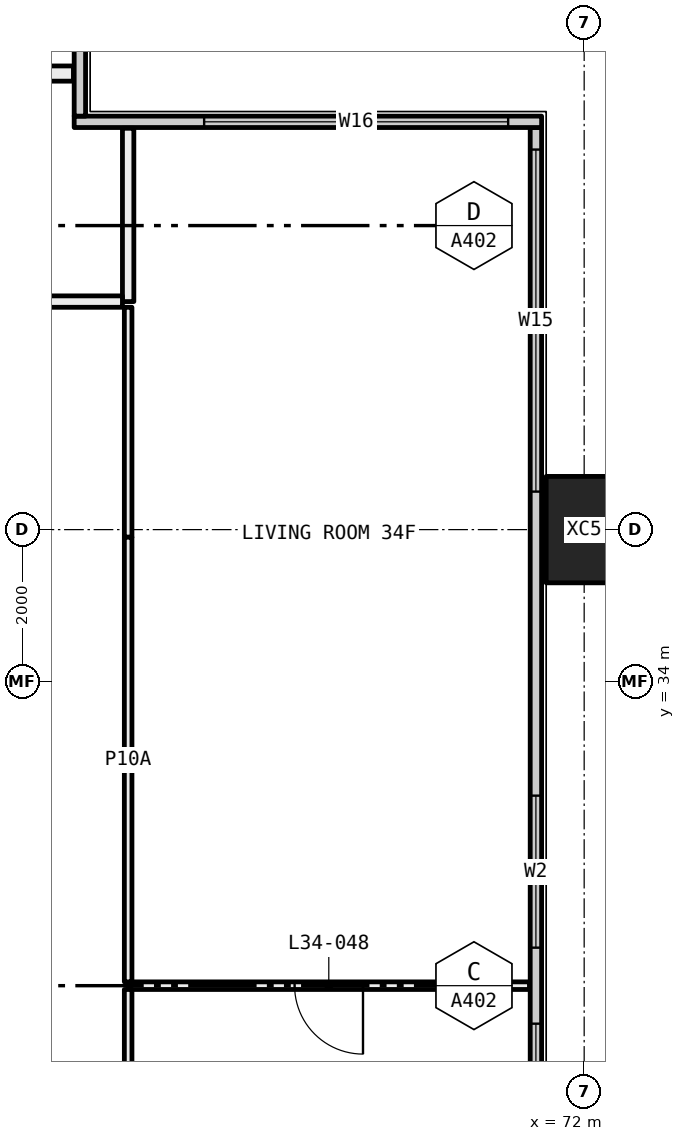
"""IFC4 building model, lengths in metres.
Left out: names, types, materials, properties, quantities, classifications, styles, units other than length and angle.
Written with IfcOpenShell. Run it as: python <this file> out.ifc"""

import sys

from ifc_helpers import new_model, si_unit, direction, frame, frame_2d, origin, origin_2d, place, context, subcontext, project, spatial, rectangle, hollow_rectangle, extrude, element, fill, save


model = new_model("IFC4")
c1 = context("Model", 3, precision=1e-05, world=origin(), true_north=direction((0.0, 1.0)))
c2 = subcontext(c1, "Body", "Model", "MODEL_VIEW")
j1 = project(units=[si_unit("LENGTHUNIT", "METRE"), si_unit("PLANEANGLEUNIT", "RADIAN")], contexts=[c1])
p1 = place(None, origin())
s1 = spatial("IfcSite", under=j1, at=p1, CompositionType="ELEMENT")
p2 = place(p1, origin())
s2 = spatial("IfcBuilding", under=s1, at=p2, CompositionType="ELEMENT")
p3 = place(p2, frame((0.0, 0.0, 131.1)))
s3 = spatial("IfcBuildingStorey", under=s2, at=p3, CompositionType="ELEMENT", Elevation=131.1)
p4 = place(p3, frame((72.0, 36.0, -0.4), z_axis=(0.0, 0.0, 1.0), x_axis=(0.0, 1.0, 0.0)))
e1 = element("IfcColumn", 1, at=p4, inside=s3, PredefinedType="COLUMN", context=c2, shape_type="SweptSolid", body=[
    extrude(hollow_rectangle(XDim=1.4, YDim=1.0, WallThickness=0.055, at=origin_2d()), origin(), (0.0, 0.0, 1.0), 3.45),
])
p5 = place(p3, frame((71.365, 18.71, 0.0), z_axis=(0.0, 0.0, 1.0), x_axis=(0.0, 1.0, 0.0)))
e2 = element("IfcWall", 2, at=p5, inside=s3, PredefinedType="ELEMENTEDWALL", context=c2, shape_type="SweptSolid", body=[
    extrude(rectangle(XDim=22.58, YDim=0.15, at=frame_2d((11.29, 0.0))), origin(), (0.0, 0.0, 1.0), 3.05),
])
p6 = place(p5, frame((0.29, 0.0, 0.45)))
e3 = element("IfcOpeningElement", 3, at=p6, cuts=e2, PredefinedType="OPENING", context=c2, shape_type="SweptSolid", body=[
    extrude(rectangle(XDim=4.5, YDim=2.55, at=frame_2d((2.25, 1.275))), frame((0.0, 0.085, 0.0), z_axis=(0.0, -1.0, 0.0), x_axis=(1.0, 0.0, 0.0)), (0.0, 0.0, 1.0), 0.17),
])
p7 = place(p5, frame((7.54, 0.0, 0.45)))
e4 = element("IfcOpeningElement", 4, at=p7, cuts=e2, PredefinedType="OPENING", context=c2, shape_type="SweptSolid", body=[
    extrude(rectangle(XDim=3.25, YDim=2.55, at=frame_2d((1.625, 1.275))), frame((0.0, 0.085, 0.0), z_axis=(0.0, -1.0, 0.0), x_axis=(1.0, 0.0, 0.0)), (0.0, 0.0, 1.0), 0.17),
])
p8 = place(p5, frame((11.79, 0.0, 0.45)))
e5 = element("IfcOpeningElement", 5, at=p8, cuts=e2, PredefinedType="OPENING", context=c2, shape_type="SweptSolid", body=[
    extrude(rectangle(XDim=2.0, YDim=2.55, at=frame_2d((1.0, 1.275))), frame((0.0, 0.085, 0.0), z_axis=(0.0, -1.0, 0.0), x_axis=(1.0, 0.0, 0.0)), (0.0, 0.0, 1.0), 0.17),
])
p9 = place(p5, frame((17.79, 0.0, 0.45)))
e6 = element("IfcOpeningElement", 6, at=p9, cuts=e2, PredefinedType="OPENING", context=c2, shape_type="SweptSolid", body=[
    extrude(rectangle(XDim=4.5, YDim=2.55, at=frame_2d((2.25, 1.275))), frame((0.0, 0.085, 0.0), z_axis=(0.0, -1.0, 0.0), x_axis=(1.0, 0.0, 0.0)), (0.0, 0.0, 1.0), 0.17),
])
p10 = place(p3, frame((65.29, 41.365, 0.0), z_axis=(0.0, 0.0, 1.0), x_axis=(1.0, 0.0, 0.0)))
e7 = element("IfcWall", 7, at=p10, inside=s3, PredefinedType="ELEMENTEDWALL", context=c2, shape_type="SweptSolid", body=[
    extrude(rectangle(XDim=6.15, YDim=0.15, at=frame_2d((3.075, 0.0))), origin(), (0.0, 0.0, 1.0), 3.05),
])
p11 = place(p10, frame((1.71, 0.0, 0.45)))
e8 = element("IfcOpeningElement", 8, at=p11, cuts=e7, PredefinedType="OPENING", context=c2, shape_type="SweptSolid", body=[
    extrude(rectangle(XDim=4.0, YDim=2.55, at=frame_2d((2.0, 1.275))), frame((0.0, 0.085, 0.0), z_axis=(0.0, -1.0, 0.0), x_axis=(1.0, 0.0, 0.0)), (0.0, 0.0, 1.0), 0.17),
])
p12 = place(p3, frame((65.365, 41.44, 0.0), z_axis=(0.0, 0.0, 1.0), x_axis=(0.0, 1.0, 0.0)))
e9 = element("IfcWall", 9, at=p12, inside=s3, PredefinedType="ELEMENTEDWALL", context=c2, shape_type="SweptSolid", body=[
    extrude(rectangle(XDim=5.85, YDim=0.15, at=frame_2d((2.925, 0.0))), origin(), (0.0, 0.0, 1.0), 3.05),
])
p13 = place(p12, frame((1.56, 0.0, 0.45)))
e10 = element("IfcOpeningElement", 10, at=p13, cuts=e9, PredefinedType="OPENING", context=c2, shape_type="SweptSolid", body=[
    extrude(rectangle(XDim=4.0, YDim=2.55, at=frame_2d((2.0, 1.275))), frame((0.0, 0.085, 0.0), z_axis=(0.0, -1.0, 0.0), x_axis=(1.0, 0.0, 0.0)), (0.0, 0.0, 1.0), 0.17),
])
p14 = place(p3, frame((61.9, 42.0, 0.0), z_axis=(0.0, 0.0, 1.0), x_axis=(1.0, 0.0, 0.0)))
e11 = element("IfcWall", 11, at=p14, inside=s3, PredefinedType="PARTITIONING", context=c2, shape_type="SweptSolid", body=[
    extrude(rectangle(XDim=3.38, YDim=0.2, at=frame_2d((1.69, 0.0))), origin(), (0.0, 0.0, 1.0), 3.05),
])
p15 = place(p3, frame((71.28, 30.0, 0.0), z_axis=(0.0, 0.0, 1.0), x_axis=(-1.0, 0.0, 0.0)))
e12 = element("IfcWall", 12, at=p15, inside=s3, PredefinedType="PARTITIONING", context=c2, shape_type="SweptSolid", body=[
    extrude(rectangle(XDim=5.28, YDim=0.1, at=frame_2d((2.64, 0.0))), origin(), (0.0, 0.0, 1.0), 3.05),
])
p16 = place(p15, frame((2.19, 0.0, 0.0)))
e13 = element("IfcOpeningElement", 13, at=p16, cuts=e12, PredefinedType="OPENING", context=c2, shape_type="SweptSolid", body=[
    extrude(rectangle(XDim=0.9, YDim=2.1, at=frame_2d((0.45, 1.05))), frame((0.0, 0.06, 0.0), z_axis=(0.0, -1.0, 0.0), x_axis=(1.0, 0.0, 0.0)), (0.0, 0.0, 1.0), 0.12),
])
p17 = place(p3, frame((66.0, 29.95, 0.0), z_axis=(0.0, 0.0, 1.0), x_axis=(0.0, -1.0, 0.0)))
e14 = element("IfcWall", 14, at=p17, inside=s3, PredefinedType="PARTITIONING", context=c2, shape_type="SweptSolid", body=[
    extrude(rectangle(XDim=4.45, YDim=0.1, at=frame_2d((2.225, 0.0))), origin(), (0.0, 0.0, 1.0), 3.05),
])
p18 = place(p3, frame((66.0, 38.925, 0.0), z_axis=(0.0, 0.0, 1.0), x_axis=(0.0, -1.0, 0.0)))
e15 = element("IfcWall", 15, at=p18, inside=s3, PredefinedType="PARTITIONING", context=c2, shape_type="SweptSolid", body=[
    extrude(rectangle(XDim=3.025, YDim=0.1, at=frame_2d((1.513, 0.0))), origin(), (0.0, 0.0, 1.0), 2.45),
])
p19 = place(p3, frame((66.0, 35.9, 0.0), z_axis=(0.0, 0.0, 1.0), x_axis=(0.0, -1.0, 0.0)))
e16 = element("IfcWall", 16, at=p19, inside=s3, PredefinedType="PARTITIONING", context=c2, shape_type="SweptSolid", body=[
    extrude(rectangle(XDim=5.85, YDim=0.1, at=frame_2d((2.925, 0.0))), origin(), (0.0, 0.0, 1.0), 3.05),
])
p20 = place(p3, frame((66.0, 41.28, 0.0), z_axis=(0.0, 0.0, 1.0), x_axis=(0.0, -1.0, 0.0)))
e17 = element("IfcWall", 17, at=p20, inside=s3, PredefinedType="PARTITIONING", context=c2, shape_type="SweptSolid", body=[
    extrude(rectangle(XDim=2.28, YDim=0.15, at=frame_2d((1.14, 0.0))), origin(), (0.0, 0.0, 1.0), 3.05),
])
p21 = place(p3, frame((65.925, 39.0, 0.0), z_axis=(0.0, 0.0, 1.0), x_axis=(-1.0, 0.0, 0.0)))
e18 = element("IfcWall", 18, at=p21, inside=s3, PredefinedType="PARTITIONING", context=c2, shape_type="SweptSolid", body=[
    extrude(rectangle(XDim=3.925, YDim=0.15, at=frame_2d((1.962, 0.0))), origin(), (0.0, 0.0, 1.0), 3.05),
])
p22 = place(p21, frame((1.512, 0.0, 0.0)))
e19 = element("IfcOpeningElement", 19, at=p22, cuts=e18, PredefinedType="OPENING", context=c2, shape_type="SweptSolid", body=[
    extrude(rectangle(XDim=0.9, YDim=2.1, at=frame_2d((0.45, 1.05))), frame((0.0, 0.085, 0.0), z_axis=(0.0, -1.0, 0.0), x_axis=(1.0, 0.0, 0.0)), (0.0, 0.0, 1.0), 0.17),
])
p23 = place(p7, origin())
e20 = element("IfcWindow", 20, at=p23, inside=s3, PartitioningType="SINGLE_PANEL", PredefinedType="WINDOW", context=c2, shape_type="SweptSolid", body=[
    extrude(rectangle(XDim=3.25, YDim=2.55, at=frame_2d((1.625, 1.275))), frame((0.0, 0.03, 0.0), z_axis=(0.0, -1.0, 0.0), x_axis=(1.0, 0.0, 0.0)), (0.0, 0.0, 1.0), 0.06),
])
fill(e4, e20)
p24 = place(p8, origin())
e21 = element("IfcWindow", 21, at=p24, inside=s3, PartitioningType="SINGLE_PANEL", PredefinedType="WINDOW", context=c2, shape_type="SweptSolid", body=[
    extrude(rectangle(XDim=2.0, YDim=2.55, at=frame_2d((1.0, 1.275))), frame((0.0, 0.03, 0.0), z_axis=(0.0, -1.0, 0.0), x_axis=(1.0, 0.0, 0.0)), (0.0, 0.0, 1.0), 0.06),
])
fill(e5, e21)
p25 = place(p9, origin())
e22 = element("IfcWindow", 22, at=p25, inside=s3, PartitioningType="SINGLE_PANEL", PredefinedType="WINDOW", context=c2, shape_type="SweptSolid", body=[
    extrude(rectangle(XDim=4.5, YDim=2.55, at=frame_2d((2.25, 1.275))), frame((0.0, 0.03, 0.0), z_axis=(0.0, -1.0, 0.0), x_axis=(1.0, 0.0, 0.0)), (0.0, 0.0, 1.0), 0.06),
])
fill(e6, e22)
p26 = place(p11, origin())
e23 = element("IfcWindow", 23, at=p26, inside=s3, PartitioningType="SINGLE_PANEL", PredefinedType="WINDOW", context=c2, shape_type="SweptSolid", body=[
    extrude(rectangle(XDim=4.0, YDim=2.55, at=frame_2d((2.0, 1.275))), frame((0.0, 0.03, 0.0), z_axis=(0.0, -1.0, 0.0), x_axis=(1.0, 0.0, 0.0)), (0.0, 0.0, 1.0), 0.06),
])
fill(e8, e23)
p27 = place(p16, origin())
e24 = element("IfcDoor", 24, at=p27, inside=s3, OperationType="SINGLE_SWING_RIGHT", PredefinedType="DOOR", context=c2, shape_type="SweptSolid", body=[
    extrude(rectangle(XDim=0.9, YDim=2.1, at=frame_2d((0.45, 1.05))), frame((0.0, 0.025, 0.0), z_axis=(0.0, -1.0, 0.0), x_axis=(1.0, 0.0, 0.0)), (0.0, 0.0, 1.0), 0.05),
])
fill(e13, e24)
save(model, sys.argv[1])
